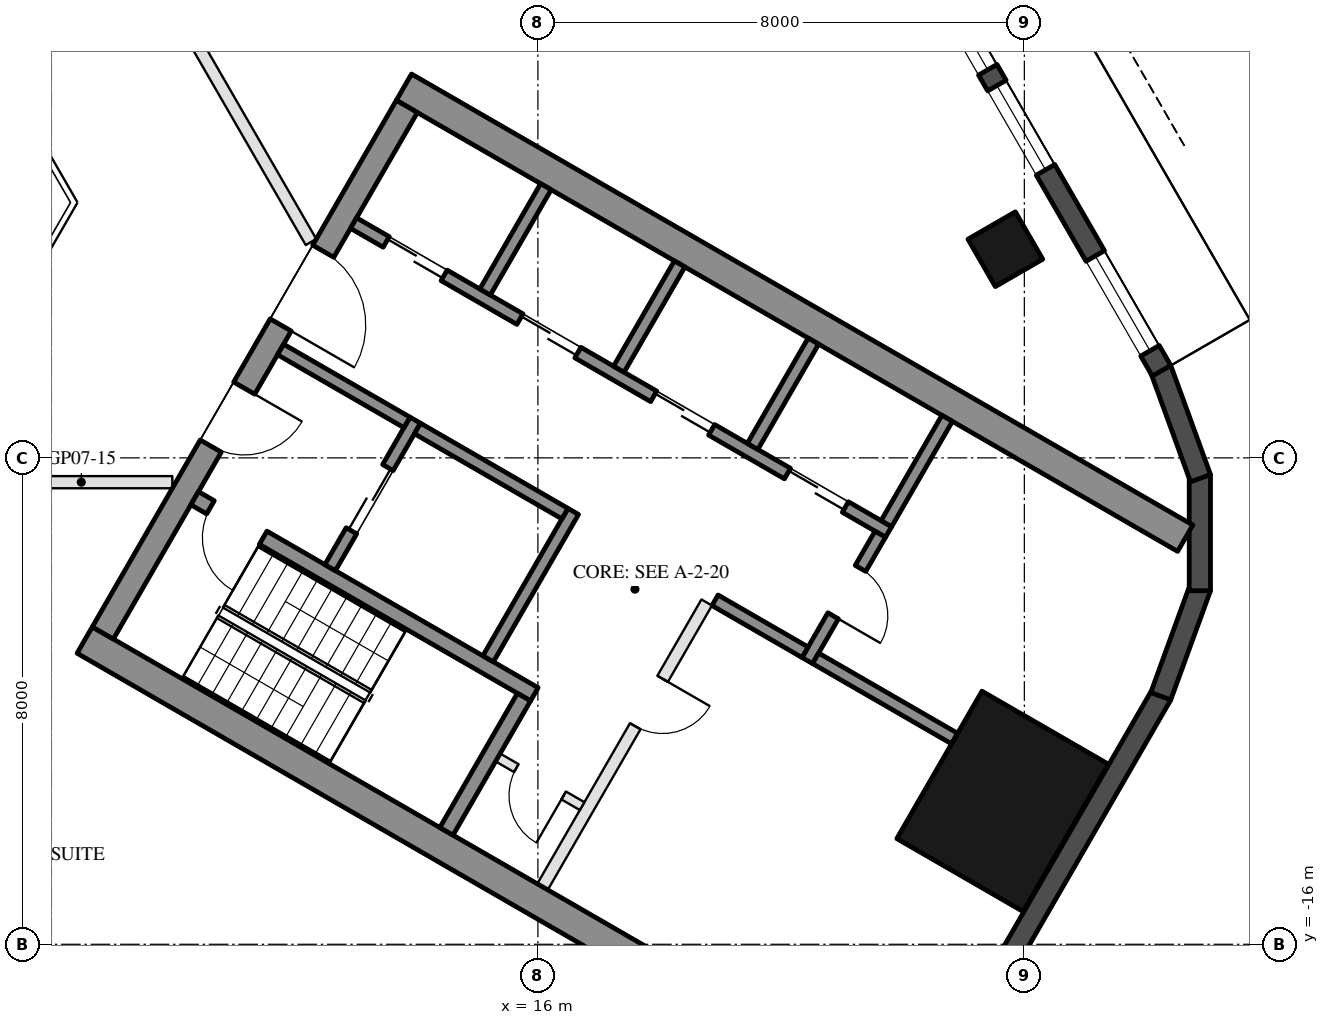
"""IFC4 building model, lengths in metres.
Left out: names, types, materials, properties, quantities, classifications, styles, units other than length and angle.
Written with IfcOpenShell. Run it as: python <this file> out.ifc"""

import sys

from ifc_helpers import new_model, si_unit, direction, frame, frame_2d, origin, origin_2d, place, context, subcontext, project, spatial, rectangle, hollow_rectangle, extrude, element, fill, save


model = new_model("IFC4")
c1 = context("Model", 3, precision=1e-05, world=origin(), true_north=direction((0.0, 1.0)))
c2 = subcontext(c1, "Body", "Model", "MODEL_VIEW")
j1 = project(units=[si_unit("LENGTHUNIT", "METRE"), si_unit("PLANEANGLEUNIT", "RADIAN")], contexts=[c1])
p1 = place(None, origin())
s1 = spatial("IfcSite", under=j1, at=p1, CompositionType="ELEMENT")
p2 = place(p1, origin())
s2 = spatial("IfcBuilding", under=s1, at=p2, CompositionType="ELEMENT")
p3 = place(p2, frame((0.0, 0.0, 94.6)))
s3 = spatial("IfcBuildingStorey", under=s2, at=p3, CompositionType="ELEMENT", Elevation=94.6)
p4 = place(p3, frame((23.688, -4.568, 0.0), z_axis=(0.0, 0.0, 1.0), x_axis=(-0.5, 0.866025403784, 0.0)))
e1 = element("IfcColumn", 1, at=p4, inside=s3, PredefinedType="COLUMN", context=c2, shape_type="SweptSolid", body=[
    extrude(hollow_rectangle(XDim=0.9, YDim=0.9, WallThickness=0.04, at=origin_2d()), origin(), (0.0, 0.0, 1.0), 3.7),
])
p5 = place(p3, frame((23.643, -13.65, 0.0), z_axis=(0.0, 0.0, 1.0), x_axis=(0.5, 0.866025403784, 0.0)))
e2 = element("IfcColumn", 2, at=p5, inside=s3, PredefinedType="COLUMN", context=c2, shape_type="SweptSolid", body=[
    extrude(hollow_rectangle(XDim=2.8, YDim=2.4, WallThickness=0.07, at=origin_2d()), origin(), (0.0, 0.0, 1.0), 3.7),
])
p6 = place(p3, frame((23.427, -16.792, 0.0), z_axis=(0.0, 0.0, 1.0), x_axis=(0.500018773155, 0.866014564827, 0.0)))
e3 = element("IfcWall", 3, at=p6, inside=s3, PredefinedType="SOLIDWALL", context=c2, shape_type="SweptSolid", body=[
    extrude(rectangle(XDim=5.658, YDim=0.35, at=frame_2d((2.829, 0.0))), origin(), (0.0, 0.0, 1.0), 3.55),
])
for number, where, z_axis, x_axis in (
    (4, (26.244, -11.92, 0.0), (0.0, 0.0, 1.0), (0.342, 0.94, 0.0)),
    (5, (26.886, -10.185, 0.0), (0.0, 0.0, 1.0), (0.0, 1.0, 0.0)),
    (6, (26.897, -8.335, 0.0), (0.0, 0.0, 1.0), (-0.342, 0.94, 0.0)),
):
    element("IfcWall", number, at=place(p3, frame(where, z_axis=z_axis, x_axis=x_axis)), inside=s3, PredefinedType="SOLIDWALL", context=c2, shape_type="SweptSolid", body=[
        extrude(rectangle(XDim=1.91, YDim=0.35, at=frame_2d((0.955, 0.0))), origin(), (0.0, 0.0, 1.0), 3.55),
    ])
p7 = place(p3, frame((26.257, -6.567, 0.0), z_axis=(0.0, 0.0, 1.0), x_axis=(-0.500023526245, 0.866011820475, 0.0)))
e7 = element("IfcWall", 7, at=p7, inside=s3, PredefinedType="SOLIDWALL", context=c2, shape_type="SweptSolid", body=[
    extrude(rectangle(XDim=11.816, YDim=0.35, at=frame_2d((5.908, 0.0))), origin(), (0.0, 0.0, 1.0), 3.55),
])
p8 = place(p7, frame((0.38, 0.0, 0.3)))
e8 = element("IfcOpeningElement", 8, at=p8, cuts=e7, PredefinedType="OPENING", context=c2, shape_type="SweptSolid", body=[
    extrude(rectangle(XDim=1.8, YDim=2.65, at=frame_2d((0.9, 1.325))), frame((0.0, 0.185, 0.0), z_axis=(0.0, -1.0, 0.0), x_axis=(1.0, 0.0, 0.0)), (0.0, 0.0, 1.0), 0.37),
])
p9 = place(p7, frame((7.716, 0.0, 0.0)))
e9 = element("IfcOpeningElement", 9, at=p9, cuts=e7, PredefinedType="OPENING", context=c2, shape_type="SweptSolid", body=[
    extrude(rectangle(XDim=2.4, YDim=2.4, at=frame_2d((1.2, 1.2))), frame((0.0, 0.185, 0.0), z_axis=(0.0, -1.0, 0.0), x_axis=(1.0, 0.0, 0.0)), (0.0, 0.0, 1.0), 0.37),
])
p10 = place(p7, frame((3.816, 0.0, 0.3)))
e10 = element("IfcOpeningElement", 10, at=p10, cuts=e7, PredefinedType="OPENING", context=c2, shape_type="SweptSolid", body=[
    extrude(rectangle(XDim=1.6, YDim=2.65, at=frame_2d((0.8, 1.325))), frame((0.0, 0.185, 0.0), z_axis=(0.0, -1.0, 0.0), x_axis=(1.0, 0.0, 0.0)), (0.0, 0.0, 1.0), 0.37),
])
p11 = place(p7, frame((5.716, 0.0, 0.3)))
e11 = element("IfcOpeningElement", 11, at=p11, cuts=e7, PredefinedType="OPENING", context=c2, shape_type="SweptSolid", body=[
    extrude(rectangle(XDim=1.6, YDim=2.65, at=frame_2d((0.8, 1.325))), frame((0.0, 0.185, 0.0), z_axis=(0.0, -1.0, 0.0), x_axis=(1.0, 0.0, 0.0)), (0.0, 0.0, 1.0), 0.37),
])
for number, where, z_axis, x_axis in (
    (12, (8.547, -10.997, 0.0), (0.0, 0.0, 1.0), (0.866, -0.5, 0.0)),
    (13, (13.797, -1.903, 0.0), (0.0, 0.0, 1.0), (0.866, -0.5, 0.0)),
):
    element("IfcWall", number, at=place(p3, frame(where, z_axis=z_axis, x_axis=x_axis)), inside=s3, PredefinedType="SHEAR", context=c2, shape_type="SweptSolid", body=[
        extrude(rectangle(XDim=14.837, YDim=0.5, at=frame_2d((7.418, 0.0))), origin(), (0.0, 0.0, 1.0), 3.5),
    ])
p12 = place(p3, frame((8.845, -10.88, 0.0), z_axis=(0.0, 0.0, 1.0), x_axis=(0.500004234368, 0.866022959057, 0.0)))
e14 = element("IfcWall", 14, at=p12, inside=s3, PredefinedType="SHEAR", context=c2, shape_type="SweptSolid", body=[
    extrude(rectangle(XDim=10.0, YDim=0.4, at=frame_2d((5.0, 0.0))), origin(), (0.0, 0.0, 1.0), 3.5),
])
p13 = place(p12, frame((3.55, 0.0, 0.0)))
e15 = element("IfcOpeningElement", 15, at=p13, cuts=e14, PredefinedType="OPENING", context=c2, shape_type="SweptSolid", body=[
    extrude(rectangle(XDim=1.1, YDim=2.1, at=frame_2d((0.55, 1.05))), frame((0.0, 0.21, 0.0), z_axis=(0.0, -1.0, 0.0), x_axis=(1.0, 0.0, 0.0)), (0.0, 0.0, 1.0), 0.42),
])
p14 = place(p12, frame((5.85, 0.0, 0.0)))
e16 = element("IfcOpeningElement", 16, at=p14, cuts=e14, PredefinedType="OPENING", context=c2, shape_type="SweptSolid", body=[
    extrude(rectangle(XDim=1.4, YDim=2.1, at=frame_2d((0.7, 1.05))), frame((0.0, 0.21, 0.0), z_axis=(0.0, -1.0, 0.0), x_axis=(1.0, 0.0, 0.0)), (0.0, 0.0, 1.0), 0.42),
])
p15 = place(p3, frame((10.356, -8.664, 0.0), z_axis=(0.0, 0.0, 1.0), x_axis=(0.866028629588, -0.499994412703, 0.0)))
e17 = element("IfcWall", 17, at=p15, inside=s3, PredefinedType="SHEAR", context=c2, shape_type="SweptSolid", body=[
    extrude(rectangle(XDim=6.45, YDim=0.25, at=frame_2d((3.225, 0.0))), origin(), (0.0, 0.0, 1.0), 3.5),
])
p16 = place(p15, frame((0.3, 0.0, 0.0)))
e18 = element("IfcOpeningElement", 18, at=p16, cuts=e17, PredefinedType="OPENING", context=c2, shape_type="SweptSolid", body=[
    extrude(rectangle(XDim=1.0, YDim=2.1, at=frame_2d((0.5, 1.05))), frame((0.0, 0.135, 0.0), z_axis=(0.0, -1.0, 0.0), x_axis=(1.0, 0.0, 0.0)), (0.0, 0.0, 1.0), 0.27),
])
p17 = place(p3, frame((14.496, -14.143, 0.0), z_axis=(0.0, 0.0, 1.0), x_axis=(0.500062241894, 0.865989465428, 0.0)))
e19 = element("IfcWall", 19, at=p17, inside=s3, PredefinedType="SHEAR", context=c2, shape_type="SweptSolid", body=[
    extrude(rectangle(XDim=2.55, YDim=0.25, at=frame_2d((1.275, 0.0))), origin(), (0.0, 0.0, 1.0), 3.5),
])
p18 = place(p3, frame((15.181, -11.305, 0.0), z_axis=(0.0, 0.0, 1.0), x_axis=(0.49994636267, 0.866056369097, 0.0)))
e20 = element("IfcWall", 20, at=p18, inside=s3, PredefinedType="SHEAR", context=c2, shape_type="SweptSolid", body=[
    extrude(rectangle(XDim=2.8, YDim=0.2, at=frame_2d((1.4, 0.0))), origin(), (0.0, 0.0, 1.0), 3.5),
])
p19 = place(p3, frame((12.583, -9.805, 0.0), z_axis=(0.0, 0.0, 1.0), x_axis=(0.49994636267, 0.866056369097, 0.0)))
e21 = element("IfcWall", 21, at=p19, inside=s3, PredefinedType="SHEAR", context=c2, shape_type="SweptSolid", body=[
    extrude(rectangle(XDim=2.8, YDim=0.2, at=frame_2d((1.4, 0.0))), origin(), (0.0, 0.0, 1.0), 3.5),
])
p20 = place(p19, frame((0.7, 0.0, 0.0)))
e22 = element("IfcOpeningElement", 22, at=p20, cuts=e21, PredefinedType="OPENING", context=c2, shape_type="SweptSolid", body=[
    extrude(rectangle(XDim=1.2, YDim=2.1, at=frame_2d((0.6, 1.05))), frame((0.0, 0.11, 0.0), z_axis=(0.0, -1.0, 0.0), x_axis=(1.0, 0.0, 0.0)), (0.0, 0.0, 1.0), 0.22),
])
p21 = place(p3, frame((11.768, -6.217, 0.0), z_axis=(0.0, 0.0, 1.0), x_axis=(0.866050077142, -0.499957262057, 0.0)))
e23 = element("IfcWall", 23, at=p21, inside=s3, PredefinedType="SHEAR", context=c2, shape_type="SweptSolid", body=[
    extrude(rectangle(XDim=2.4, YDim=0.2, at=frame_2d((1.2, 0.0))), origin(), (0.0, 0.0, 1.0), 3.5),
])
p22 = place(p3, frame((14.02, -7.517, 0.0), z_axis=(0.0, 0.0, 1.0), x_axis=(0.866034573852, -0.49998411664, 0.0)))
e24 = element("IfcWall", 24, at=p22, inside=s3, PredefinedType="SHEAR", context=c2, shape_type="SweptSolid", body=[
    extrude(rectangle(XDim=2.8, YDim=0.2, at=frame_2d((1.4, 0.0))), origin(), (0.0, 0.0, 1.0), 3.5),
])
p23 = place(p3, frame((12.968, -4.138, 0.0), z_axis=(0.0, 0.0, 1.0), x_axis=(0.866028328073, -0.49999493495, 0.0)))
e25 = element("IfcWall", 25, at=p23, inside=s3, PredefinedType="SHEAR", context=c2, shape_type="SweptSolid", body=[
    extrude(rectangle(XDim=10.16, YDim=0.2, at=frame_2d((5.08, 0.0))), origin(), (0.0, 0.0, 1.0), 3.5),
])
p24 = place(p23, frame((0.62, 0.0, 0.0)))
e26 = element("IfcOpeningElement", 26, at=p24, cuts=e25, PredefinedType="OPENING", context=c2, shape_type="SweptSolid", body=[
    extrude(rectangle(XDim=1.1, YDim=2.1, at=frame_2d((0.55, 1.05))), frame((0.0, 0.11, 0.0), z_axis=(0.0, -1.0, 0.0), x_axis=(1.0, 0.0, 0.0)), (0.0, 0.0, 1.0), 0.22),
])
p25 = place(p23, frame((3.16, 0.0, 0.0)))
e27 = element("IfcOpeningElement", 27, at=p25, cuts=e25, PredefinedType="OPENING", context=c2, shape_type="SweptSolid", body=[
    extrude(rectangle(XDim=1.1, YDim=2.1, at=frame_2d((0.55, 1.05))), frame((0.0, 0.11, 0.0), z_axis=(0.0, -1.0, 0.0), x_axis=(1.0, 0.0, 0.0)), (0.0, 0.0, 1.0), 0.22),
])
p26 = place(p23, frame((5.7, 0.0, 0.0)))
e28 = element("IfcOpeningElement", 28, at=p26, cuts=e25, PredefinedType="OPENING", context=c2, shape_type="SweptSolid", body=[
    extrude(rectangle(XDim=1.1, YDim=2.1, at=frame_2d((0.55, 1.05))), frame((0.0, 0.11, 0.0), z_axis=(0.0, -1.0, 0.0), x_axis=(1.0, 0.0, 0.0)), (0.0, 0.0, 1.0), 0.22),
])
p27 = place(p23, frame((8.24, 0.0, 0.0)))
e29 = element("IfcOpeningElement", 29, at=p27, cuts=e25, PredefinedType="OPENING", context=c2, shape_type="SweptSolid", body=[
    extrude(rectangle(XDim=1.1, YDim=2.1, at=frame_2d((0.55, 1.05))), frame((0.0, 0.11, 0.0), z_axis=(0.0, -1.0, 0.0), x_axis=(1.0, 0.0, 0.0)), (0.0, 0.0, 1.0), 0.22),
])
p28 = place(p3, frame((20.43, -11.333, 0.0), z_axis=(0.0, 0.0, 1.0), x_axis=(0.500001309137, 0.866024647952, 0.0)))
e30 = element("IfcWall", 30, at=p28, inside=s3, PredefinedType="SHEAR", context=c2, shape_type="SweptSolid", body=[
    extrude(rectangle(XDim=2.4, YDim=0.2, at=frame_2d((1.2, 0.0))), origin(), (0.0, 0.0, 1.0), 3.5),
])
p29 = place(p28, frame((0.85, 0.0, 0.0)))
e31 = element("IfcOpeningElement", 31, at=p29, cuts=e30, PredefinedType="OPENING", context=c2, shape_type="SweptSolid", body=[
    extrude(rectangle(XDim=0.9, YDim=2.1, at=frame_2d((0.45, 1.05))), frame((0.0, 0.11, 0.0), z_axis=(0.0, -1.0, 0.0), x_axis=(1.0, 0.0, 0.0)), (0.0, 0.0, 1.0), 0.22),
])
p30 = place(p3, frame((18.913, -10.342, 0.0), z_axis=(0.0, 0.0, 1.0), x_axis=(0.866038183914, -0.499977863513, 0.0)))
e32 = element("IfcWall", 32, at=p30, inside=s3, PredefinedType="SHEAR", context=c2, shape_type="SweptSolid", body=[
    extrude(rectangle(XDim=1.71, YDim=0.2, at=frame_2d((0.855, 0.0))), origin(), (0.0, 0.0, 1.0), 3.5),
])
for number, where, z_axis, x_axis in (
    (33, (15.131, -5.272, 0.0), (0.0, 0.0, 1.0), (0.5, 0.866, 0.0)),
    (34, (17.331, -6.542, 0.0), (0.0, 0.0, 1.0), (0.5, 0.866, 0.0)),
    (35, (19.531, -7.812, 0.0), (0.0, 0.0, 1.0), (0.5, 0.866, 0.0)),
    (36, (21.73, -9.082, 0.0), (0.0, 0.0, 1.0), (0.5, 0.866, 0.0)),
):
    element("IfcWall", number, at=place(p3, frame(where, z_axis=z_axis, x_axis=x_axis)), inside=s3, PredefinedType="SHEAR", context=c2, shape_type="SweptSolid", body=[
        extrude(rectangle(XDim=2.0, YDim=0.2, at=frame_2d((1.0, 0.0))), origin(), (0.0, 0.0, 1.0), 3.5),
    ])
p31 = place(p3, frame((20.567, -11.297, 0.0), z_axis=(0.0, 0.0, 1.0), x_axis=(0.866060851709, -0.499938597367, 0.0)))
e37 = element("IfcWall", 37, at=p31, inside=s3, PredefinedType="SHEAR", context=c2, shape_type="SweptSolid", body=[
    extrude(rectangle(XDim=2.64, YDim=0.2, at=frame_2d((1.32, 0.0))), origin(), (0.0, 0.0, 1.0), 3.5),
])
p32 = place(p3, frame((16.076, -15.055, 0.0), z_axis=(0.0, 0.0, 1.0), x_axis=(0.499995103361, 0.866028230842, 0.0)))
e38 = element("IfcWall", 38, at=p32, inside=s3, PredefinedType="PARTITIONING", context=c2, shape_type="SweptSolid", body=[
    extrude(rectangle(XDim=5.4, YDim=0.2, at=frame_2d((2.7, 0.0))), origin(), (0.0, 0.0, 1.0), 3.5),
])
p33 = place(p32, frame((3.05, 0.0, 0.0)))
e39 = element("IfcOpeningElement", 39, at=p33, cuts=e38, PredefinedType="OPENING", context=c2, shape_type="SweptSolid", body=[
    extrude(rectangle(XDim=0.9, YDim=2.1, at=frame_2d((0.45, 1.05))), frame((0.0, 0.11, 0.0), z_axis=(0.0, -1.0, 0.0), x_axis=(1.0, 0.0, 0.0)), (0.0, 0.0, 1.0), 0.22),
])
p34 = place(p3, frame((15.342, -12.928, 0.0), z_axis=(0.0, 0.0, 1.0), x_axis=(0.865989903783, -0.500061482766, 0.0)))
e40 = element("IfcWall", 40, at=p34, inside=s3, PredefinedType="PARTITIONING", context=c2, shape_type="SweptSolid", body=[
    extrude(rectangle(XDim=1.6, YDim=0.15, at=frame_2d((0.8, 0.0))), origin(), (0.0, 0.0, 1.0), 3.5),
])
p35 = place(p34, frame((0.35, 0.0, 0.0)))
e41 = element("IfcOpeningElement", 41, at=p35, cuts=e40, PredefinedType="OPENING", context=c2, shape_type="SweptSolid", body=[
    extrude(rectangle(XDim=0.9, YDim=2.1, at=frame_2d((0.45, 1.05))), frame((0.0, 0.085, 0.0), z_axis=(0.0, -1.0, 0.0), x_axis=(1.0, 0.0, 0.0)), (0.0, 0.0, 1.0), 0.17),
])
p36 = place(p3, frame((9.988, -8.4, 0.0), z_axis=(0.0, 0.0, 1.0), x_axis=(-1.0, 0.0, 0.0)))
e42 = element("IfcWall", 42, at=p36, inside=s3, PredefinedType="PARTITIONING", context=c2, shape_type="SweptSolid", body=[
    extrude(rectangle(XDim=7.488, YDim=0.2, at=frame_2d((3.744, 0.0))), origin(), (0.0, 0.0, 1.0), 2.95),
])
p37 = place(p36, frame((3.244, 0.0, 0.0)))
e43 = element("IfcOpeningElement", 43, at=p37, cuts=e42, PredefinedType="OPENING", context=c2, shape_type="SweptSolid", body=[
    extrude(rectangle(XDim=1.0, YDim=2.1, at=frame_2d((0.5, 1.05))), frame((0.0, 0.11, 0.0), z_axis=(0.0, -1.0, 0.0), x_axis=(1.0, 0.0, 0.0)), (0.0, 0.0, 1.0), 0.22),
])
p38 = place(p3, frame((6.325, 5.845, 0.0), z_axis=(0.0, 0.0, 1.0), x_axis=(0.500002143212, -0.866024166397, 0.0)))
e44 = element("IfcWall", 44, at=p38, inside=s3, PredefinedType="PARTITIONING", context=c2, shape_type="SweptSolid", body=[
    extrude(rectangle(XDim=11.888, YDim=0.2, at=frame_2d((5.944, 0.0))), origin(), (0.0, 0.0, 1.0), 2.95),
])
p39 = place(p38, frame((5.444, 0.0, 0.0)))
e45 = element("IfcOpeningElement", 45, at=p39, cuts=e44, PredefinedType="OPENING", context=c2, shape_type="SweptSolid", body=[
    extrude(rectangle(XDim=1.0, YDim=2.1, at=frame_2d((0.5, 1.05))), frame((0.0, 0.11, 0.0), z_axis=(0.0, -1.0, 0.0), x_axis=(1.0, 0.0, 0.0)), (0.0, 0.0, 1.0), 0.22),
])
p40 = place(p8, origin())
e46 = element("IfcWindow", 46, at=p40, inside=s3, PartitioningType="SINGLE_PANEL", PredefinedType="WINDOW", context=c2, shape_type="SweptSolid", body=[
    extrude(rectangle(XDim=1.8, YDim=2.65, at=frame_2d((0.9, 1.325))), frame((0.0, 0.03, 0.0), z_axis=(0.0, -1.0, 0.0), x_axis=(1.0, 0.0, 0.0)), (0.0, 0.0, 1.0), 0.06),
])
fill(e8, e46)
p41 = place(p10, origin())
e47 = element("IfcWindow", 47, at=p41, inside=s3, PartitioningType="SINGLE_PANEL", PredefinedType="WINDOW", context=c2, shape_type="SweptSolid", body=[
    extrude(rectangle(XDim=1.6, YDim=2.65, at=frame_2d((0.8, 1.325))), frame((0.0, 0.03, 0.0), z_axis=(0.0, -1.0, 0.0), x_axis=(1.0, 0.0, 0.0)), (0.0, 0.0, 1.0), 0.06),
])
fill(e10, e47)
p42 = place(p11, origin())
e48 = element("IfcWindow", 48, at=p42, inside=s3, PartitioningType="SINGLE_PANEL", PredefinedType="WINDOW", context=c2, shape_type="SweptSolid", body=[
    extrude(rectangle(XDim=1.6, YDim=2.65, at=frame_2d((0.8, 1.325))), frame((0.0, 0.03, 0.0), z_axis=(0.0, -1.0, 0.0), x_axis=(1.0, 0.0, 0.0)), (0.0, 0.0, 1.0), 0.06),
])
fill(e11, e48)
p43 = place(p20, origin())
e49 = element("IfcDoor", 49, at=p43, inside=s3, OperationType="DOUBLE_DOOR_SLIDING", PredefinedType="DOOR", context=c2, shape_type="SweptSolid", body=[
    extrude(rectangle(XDim=1.2, YDim=2.1, at=frame_2d((0.6, 1.05))), frame((0.0, 0.025, 0.0), z_axis=(0.0, -1.0, 0.0), x_axis=(1.0, 0.0, 0.0)), (0.0, 0.0, 1.0), 0.05),
])
fill(e22, e49)
p44 = place(p35, frame((0.9, 0.0, 0.0), z_axis=(0.0, 0.0, 1.0), x_axis=(-1.0, 0.0, 0.0)))
e50 = element("IfcDoor", 50, at=p44, inside=s3, OperationType="SINGLE_SWING_LEFT", PredefinedType="DOOR", context=c2, shape_type="SweptSolid", body=[
    extrude(rectangle(XDim=0.9, YDim=2.1, at=frame_2d((0.45, 1.05))), frame((0.0, 0.025, 0.0), z_axis=(0.0, -1.0, 0.0), x_axis=(1.0, 0.0, 0.0)), (0.0, 0.0, 1.0), 0.05),
])
fill(e41, e50)
p45 = place(p24, origin())
e51 = element("IfcDoor", 51, at=p45, inside=s3, OperationType="DOUBLE_DOOR_SLIDING", PredefinedType="DOOR", context=c2, shape_type="SweptSolid", body=[
    extrude(rectangle(XDim=1.1, YDim=2.1, at=frame_2d((0.55, 1.05))), frame((0.0, 0.025, 0.0), z_axis=(0.0, -1.0, 0.0), x_axis=(1.0, 0.0, 0.0)), (0.0, 0.0, 1.0), 0.05),
])
fill(e26, e51)
p46 = place(p25, origin())
e52 = element("IfcDoor", 52, at=p46, inside=s3, OperationType="DOUBLE_DOOR_SLIDING", PredefinedType="DOOR", context=c2, shape_type="SweptSolid", body=[
    extrude(rectangle(XDim=1.1, YDim=2.1, at=frame_2d((0.55, 1.05))), frame((0.0, 0.025, 0.0), z_axis=(0.0, -1.0, 0.0), x_axis=(1.0, 0.0, 0.0)), (0.0, 0.0, 1.0), 0.05),
])
fill(e27, e52)
p47 = place(p26, origin())
e53 = element("IfcDoor", 53, at=p47, inside=s3, OperationType="DOUBLE_DOOR_SLIDING", PredefinedType="DOOR", context=c2, shape_type="SweptSolid", body=[
    extrude(rectangle(XDim=1.1, YDim=2.1, at=frame_2d((0.55, 1.05))), frame((0.0, 0.025, 0.0), z_axis=(0.0, -1.0, 0.0), x_axis=(1.0, 0.0, 0.0)), (0.0, 0.0, 1.0), 0.05),
])
fill(e28, e53)
p48 = place(p27, origin())
e54 = element("IfcDoor", 54, at=p48, inside=s3, OperationType="DOUBLE_DOOR_SLIDING", PredefinedType="DOOR", context=c2, shape_type="SweptSolid", body=[
    extrude(rectangle(XDim=1.1, YDim=2.1, at=frame_2d((0.55, 1.05))), frame((0.0, 0.025, 0.0), z_axis=(0.0, -1.0, 0.0), x_axis=(1.0, 0.0, 0.0)), (0.0, 0.0, 1.0), 0.05),
])
fill(e29, e54)
p49 = place(p29, frame((0.9, 0.0, 0.0), z_axis=(0.0, 0.0, 1.0), x_axis=(-1.0, 0.0, 0.0)))
e55 = element("IfcDoor", 55, at=p49, inside=s3, OperationType="SINGLE_SWING_RIGHT", PredefinedType="DOOR", context=c2, shape_type="SweptSolid", body=[
    extrude(rectangle(XDim=0.9, YDim=2.1, at=frame_2d((0.45, 1.05))), frame((0.0, 0.025, 0.0), z_axis=(0.0, -1.0, 0.0), x_axis=(1.0, 0.0, 0.0)), (0.0, 0.0, 1.0), 0.05),
])
fill(e31, e55)
p50 = place(p33, frame((0.9, 0.0, 0.0), z_axis=(0.0, 0.0, 1.0), x_axis=(-1.0, 0.0, 0.0)))
e56 = element("IfcDoor", 56, at=p50, inside=s3, OperationType="SINGLE_SWING_LEFT", PredefinedType="DOOR", context=c2, shape_type="SweptSolid", body=[
    extrude(rectangle(XDim=0.9, YDim=2.1, at=frame_2d((0.45, 1.05))), frame((0.0, 0.025, 0.0), z_axis=(0.0, -1.0, 0.0), x_axis=(1.0, 0.0, 0.0)), (0.0, 0.0, 1.0), 0.05),
])
fill(e39, e56)
p51 = place(p13, frame((1.1, 0.0, 0.0), z_axis=(0.0, 0.0, 1.0), x_axis=(-1.0, 0.0, 0.0)))
e57 = element("IfcDoor", 57, at=p51, inside=s3, OperationType="SINGLE_SWING_LEFT", PredefinedType="DOOR", context=c2, shape_type="SweptSolid", body=[
    extrude(rectangle(XDim=1.1, YDim=2.1, at=frame_2d((0.55, 1.05))), frame((0.0, 0.025, 0.0), z_axis=(0.0, -1.0, 0.0), x_axis=(1.0, 0.0, 0.0)), (0.0, 0.0, 1.0), 0.05),
])
fill(e15, e57)
p52 = place(p14, frame((1.4, 0.0, 0.0), z_axis=(0.0, 0.0, 1.0), x_axis=(-1.0, 0.0, 0.0)))
e58 = element("IfcDoor", 58, at=p52, inside=s3, OperationType="DOUBLE_DOOR_SINGLE_SWING", PredefinedType="DOOR", context=c2, shape_type="SweptSolid", body=[
    extrude(rectangle(XDim=1.4, YDim=2.1, at=frame_2d((0.7, 1.05))), frame((0.0, 0.025, 0.0), z_axis=(0.0, -1.0, 0.0), x_axis=(1.0, 0.0, 0.0)), (0.0, 0.0, 1.0), 0.05),
])
fill(e16, e58)
p53 = place(p16, frame((1.0, 0.0, 0.0), z_axis=(0.0, 0.0, 1.0), x_axis=(-1.0, 0.0, 0.0)))
e59 = element("IfcDoor", 59, at=p53, inside=s3, OperationType="SINGLE_SWING_LEFT", PredefinedType="DOOR", context=c2, shape_type="SweptSolid", body=[
    extrude(rectangle(XDim=1.0, YDim=2.1, at=frame_2d((0.5, 1.05))), frame((0.0, 0.025, 0.0), z_axis=(0.0, -1.0, 0.0), x_axis=(1.0, 0.0, 0.0)), (0.0, 0.0, 1.0), 0.05),
])
fill(e18, e59)
save(model, sys.argv[1])
